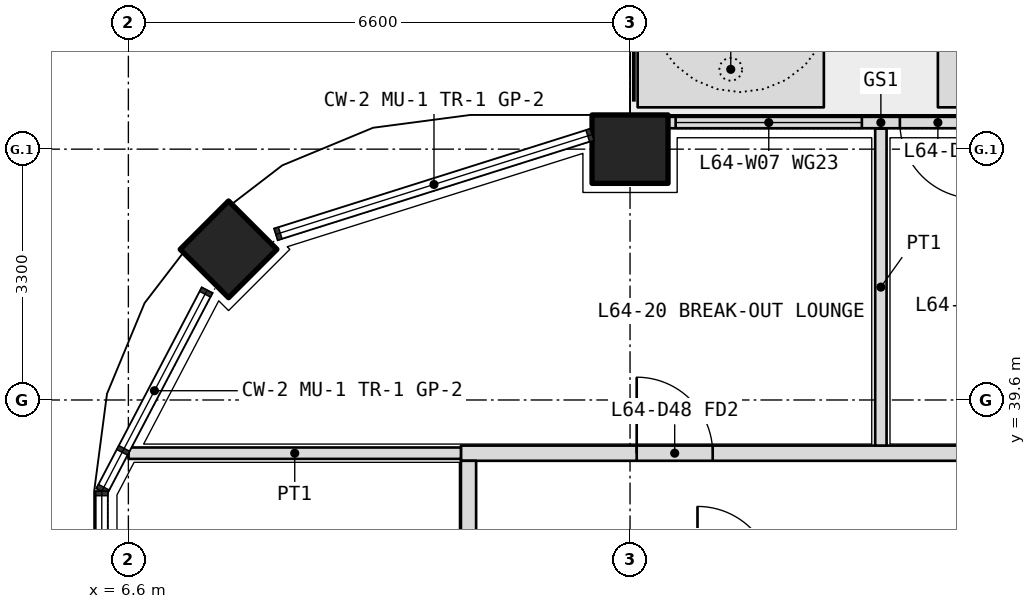
"""IFC4 building model, lengths in metres.
Left out: names, types, materials, properties, quantities, classifications, styles, units other than length and angle.
Written with IfcOpenShell. Run it as: python <this file> out.ifc"""

import sys

from ifc_helpers import new_model, si_unit, direction, frame, frame_2d, origin, origin_2d, place, context, subcontext, project, spatial, polyline, rectangle, outline, extrude, element, fill, save


model = new_model("IFC4")
c1 = context("Model", 3, precision=1e-05, world=origin(), true_north=direction((0.0, 1.0)))
c2 = subcontext(c1, "Body", "Model", "MODEL_VIEW")
j1 = project(units=[si_unit("LENGTHUNIT", "METRE"), si_unit("PLANEANGLEUNIT", "RADIAN")], contexts=[c1])
p1 = place(None, origin())
s1 = spatial("IfcSite", under=j1, at=p1, CompositionType="ELEMENT")
p2 = place(p1, origin())
s2 = spatial("IfcBuilding", under=s1, at=p2, CompositionType="ELEMENT")
p3 = place(p2, frame((0.0, 0.0, 279.6)))
s3 = spatial("IfcBuildingStorey", under=s2, at=p3, CompositionType="ELEMENT", Elevation=279.6)
p4 = place(p3, frame((7.918, 41.582, 0.0), z_axis=(0.0, 0.0, 1.0), x_axis=(0.707106781187, 0.707106781187, 0.0)))
e1 = element("IfcColumn", 1, at=p4, inside=s3, PredefinedType="COLUMN", context=c2, shape_type="SweptSolid", body=[
    extrude(rectangle(XDim=0.9, YDim=0.9, at=origin_2d()), origin(), (0.0, 0.0, 1.0), 4.2),
])
p5 = place(p3, frame((13.2, 42.9, 0.0), z_axis=(0.0, 0.0, 1.0), x_axis=(1.0, 0.0, 0.0)))
e2 = element("IfcColumn", 2, at=p5, inside=s3, PredefinedType="COLUMN", context=c2, shape_type="SweptSolid", body=[
    extrude(rectangle(XDim=1.0, YDim=0.9, at=origin_2d()), origin(), (0.0, 0.0, 1.0), 4.2),
])
p6 = place(p3, origin())
e3 = element("IfcWall", 3, at=p6, inside=s3, PredefinedType="USERDEFINED", context=c2, shape_type="SweptSolid", body=[
    extrude(outline(polyline([(13.3, 43.45), (15.75, 43.45), (15.75, 44.45), (13.3, 44.45), (13.3, 43.45)]), holes=[polyline([(13.45, 43.6), (15.6, 43.6), (15.6, 44.3), (13.45, 44.3), (13.45, 43.6)])]), origin(), (0.0, 0.0, 1.0), 1.05),
])
p7 = place(p3, origin())
e4 = element("IfcWall", 4, at=p7, inside=s3, PredefinedType="USERDEFINED", context=c2, shape_type="SweptSolid", body=[
    extrude(outline(polyline([(17.25, 43.45), (26.3, 43.45), (26.3, 44.45), (17.25, 44.45), (17.25, 43.45)]), holes=[polyline([(17.4, 43.6), (26.15, 43.6), (26.15, 44.3), (17.4, 44.3), (17.4, 43.6)])]), origin(), (0.0, 0.0, 1.0), 1.05),
])
p8 = place(p3, frame((19.3, 43.25, 0.0), z_axis=(0.0, 0.0, 1.0), x_axis=(-1.0, 0.0, 0.0)))
e5 = element("IfcWall", 5, at=p8, inside=s3, PredefinedType="SOLIDWALL", context=c2, shape_type="SweptSolid", body=[
    extrude(rectangle(XDim=5.6, YDim=0.15, at=frame_2d((2.8, 0.0))), origin(), (0.0, 0.0, 1.0), 2.7),
])
p9 = place(p8, frame((1.55, 0.0, 0.0)))
e6 = element("IfcOpeningElement", 6, at=p9, cuts=e5, PredefinedType="OPENING", context=c2, shape_type="SweptSolid", body=[
    extrude(rectangle(XDim=1.0, YDim=2.4, at=frame_2d((0.5, 1.2))), frame((0.0, 0.085, 0.0), z_axis=(0.0, -1.0, 0.0), x_axis=(1.0, 0.0, 0.0)), (0.0, 0.0, 1.0), 0.17),
])
p10 = place(p8, frame((0.1, 0.0, 0.1)))
e7 = element("IfcOpeningElement", 7, at=p10, cuts=e5, PredefinedType="OPENING", context=c2, shape_type="SweptSolid", body=[
    extrude(rectangle(XDim=1.35, YDim=2.3, at=frame_2d((0.675, 1.15))), frame((0.0, 0.085, 0.0), z_axis=(0.0, -1.0, 0.0), x_axis=(1.0, 0.0, 0.0)), (0.0, 0.0, 1.0), 0.17),
])
p11 = place(p8, frame((3.05, 0.0, 0.1)))
e8 = element("IfcOpeningElement", 8, at=p11, cuts=e5, PredefinedType="OPENING", context=c2, shape_type="SweptSolid", body=[
    extrude(rectangle(XDim=2.45, YDim=2.3, at=frame_2d((1.225, 1.15))), frame((0.0, 0.085, 0.0), z_axis=(0.0, -1.0, 0.0), x_axis=(1.0, 0.0, 0.0)), (0.0, 0.0, 1.0), 0.17),
])
p12 = place(p3, frame((10.975, 38.9, 0.0), z_axis=(0.0, 0.0, 1.0), x_axis=(1.0, 0.0, 0.0)))
e9 = element("IfcWall", 9, at=p12, inside=s3, PredefinedType="PARTITIONING", context=c2, shape_type="SweptSolid", body=[
    extrude(rectangle(XDim=30.85, YDim=0.2, at=frame_2d((15.425, 0.0))), origin(), (0.0, 0.0, 1.0), 3.0),
])
p13 = place(p12, frame((2.312, 0.0, 0.0)))
e10 = element("IfcOpeningElement", 10, at=p13, cuts=e9, PredefinedType="OPENING", context=c2, shape_type="SweptSolid", body=[
    extrude(rectangle(XDim=1.0, YDim=2.1, at=frame_2d((0.5, 1.05))), frame((0.0, 0.11, 0.0), z_axis=(0.0, -1.0, 0.0), x_axis=(1.0, 0.0, 0.0)), (0.0, 0.0, 1.0), 0.22),
])
p14 = place(p12, frame((7.125, 0.0, 0.0)))
e11 = element("IfcOpeningElement", 11, at=p14, cuts=e9, PredefinedType="OPENING", context=c2, shape_type="SweptSolid", body=[
    extrude(rectangle(XDim=1.0, YDim=2.1, at=frame_2d((0.5, 1.05))), frame((0.0, 0.11, 0.0), z_axis=(0.0, -1.0, 0.0), x_axis=(1.0, 0.0, 0.0)), (0.0, 0.0, 1.0), 0.22),
])
p15 = place(p12, frame((10.425, 0.0, 0.0)))
e12 = element("IfcOpeningElement", 12, at=p15, cuts=e9, PredefinedType="OPENING", context=c2, shape_type="SweptSolid", body=[
    extrude(rectangle(XDim=1.0, YDim=2.1, at=frame_2d((0.5, 1.05))), frame((0.0, 0.11, 0.0), z_axis=(0.0, -1.0, 0.0), x_axis=(1.0, 0.0, 0.0)), (0.0, 0.0, 1.0), 0.22),
])
p16 = place(p12, frame((13.275, 0.0, 0.0)))
e13 = element("IfcOpeningElement", 13, at=p16, cuts=e9, PredefinedType="OPENING", context=c2, shape_type="SweptSolid", body=[
    extrude(rectangle(XDim=1.0, YDim=2.1, at=frame_2d((0.5, 1.05))), frame((0.0, 0.11, 0.0), z_axis=(0.0, -1.0, 0.0), x_axis=(1.0, 0.0, 0.0)), (0.0, 0.0, 1.0), 0.22),
])
p17 = place(p12, frame((22.587, 0.0, 0.0)))
e14 = element("IfcOpeningElement", 14, at=p17, cuts=e9, PredefinedType="OPENING", context=c2, shape_type="SweptSolid", body=[
    extrude(rectangle(XDim=1.0, YDim=2.1, at=frame_2d((0.5, 1.05))), frame((0.0, 0.11, 0.0), z_axis=(0.0, -1.0, 0.0), x_axis=(1.0, 0.0, 0.0)), (0.0, 0.0, 1.0), 0.22),
])
p18 = place(p3, frame((11.075, 7.4, 0.0), z_axis=(0.0, 0.0, 1.0), x_axis=(0.0, 1.0, 0.0)))
e15 = element("IfcWall", 15, at=p18, inside=s3, PredefinedType="PARTITIONING", context=c2, shape_type="SweptSolid", body=[
    extrude(rectangle(XDim=31.4, YDim=0.2, at=frame_2d((15.7, 0.0))), origin(), (0.0, 0.0, 1.0), 3.0),
])
p19 = place(p18, frame((2.35, 0.0, 0.0)))
e16 = element("IfcOpeningElement", 16, at=p19, cuts=e15, PredefinedType="OPENING", context=c2, shape_type="SweptSolid", body=[
    extrude(rectangle(XDim=1.0, YDim=2.1, at=frame_2d((0.5, 1.05))), frame((0.0, 0.11, 0.0), z_axis=(0.0, -1.0, 0.0), x_axis=(1.0, 0.0, 0.0)), (0.0, 0.0, 1.0), 0.22),
])
p20 = place(p18, frame((6.9, 0.0, 0.0)))
e17 = element("IfcOpeningElement", 17, at=p20, cuts=e15, PredefinedType="OPENING", context=c2, shape_type="SweptSolid", body=[
    extrude(rectangle(XDim=1.0, YDim=2.1, at=frame_2d((0.5, 1.05))), frame((0.0, 0.11, 0.0), z_axis=(0.0, -1.0, 0.0), x_axis=(1.0, 0.0, 0.0)), (0.0, 0.0, 1.0), 0.22),
])
p21 = place(p18, frame((10.35, 0.0, 0.0)))
e18 = element("IfcOpeningElement", 18, at=p21, cuts=e15, PredefinedType="OPENING", context=c2, shape_type="SweptSolid", body=[
    extrude(rectangle(XDim=0.9, YDim=2.1, at=frame_2d((0.45, 1.05))), frame((0.0, 0.11, 0.0), z_axis=(0.0, -1.0, 0.0), x_axis=(1.0, 0.0, 0.0)), (0.0, 0.0, 1.0), 0.22),
])
p22 = place(p18, frame((13.7, 0.0, 0.0)))
e19 = element("IfcOpeningElement", 19, at=p22, cuts=e15, PredefinedType="OPENING", context=c2, shape_type="SweptSolid", body=[
    extrude(rectangle(XDim=0.9, YDim=2.1, at=frame_2d((0.45, 1.05))), frame((0.0, 0.11, 0.0), z_axis=(0.0, -1.0, 0.0), x_axis=(1.0, 0.0, 0.0)), (0.0, 0.0, 1.0), 0.22),
])
p23 = place(p18, frame((23.1, 0.0, 0.0)))
e20 = element("IfcOpeningElement", 20, at=p23, cuts=e15, PredefinedType="OPENING", context=c2, shape_type="SweptSolid", body=[
    extrude(rectangle(XDim=1.0, YDim=2.1, at=frame_2d((0.5, 1.05))), frame((0.0, 0.11, 0.0), z_axis=(0.0, -1.0, 0.0), x_axis=(1.0, 0.0, 0.0)), (0.0, 0.0, 1.0), 0.22),
])
p24 = place(p3, frame((6.603, 38.9, 0.0), z_axis=(0.0, 0.0, 1.0), x_axis=(1.0, 0.0, 0.0)))
e21 = element("IfcWall", 21, at=p24, inside=s3, PredefinedType="PARTITIONING", context=c2, shape_type="SweptSolid", body=[
    extrude(rectangle(XDim=4.373, YDim=0.15, at=frame_2d((2.186, 0.0))), origin(), (0.0, 0.0, 1.0), 2.7),
])
p25 = place(p3, frame((16.5, 43.17, 0.0), z_axis=(0.0, 0.0, 1.0), x_axis=(0.0, -1.0, 0.0)))
e22 = element("IfcWall", 22, at=p25, inside=s3, PredefinedType="PARTITIONING", context=c2, shape_type="SweptSolid", body=[
    extrude(rectangle(XDim=4.17, YDim=0.15, at=frame_2d((2.085, 0.0))), origin(), (0.0, 0.0, 1.0), 2.7),
])
p26 = place(p9, origin())
e23 = element("IfcDoor", 23, at=p26, inside=s3, OperationType="SINGLE_SWING_LEFT", PredefinedType="DOOR", context=c2, shape_type="SweptSolid", body=[
    extrude(rectangle(XDim=1.0, YDim=2.4, at=frame_2d((0.5, 1.2))), frame((0.0, 0.025, 0.0), z_axis=(0.0, -1.0, 0.0), x_axis=(1.0, 0.0, 0.0)), (0.0, 0.0, 1.0), 0.05),
])
fill(e6, e23)
p27 = place(p11, origin())
e24 = element("IfcWindow", 24, at=p27, inside=s3, PartitioningType="SINGLE_PANEL", PredefinedType="WINDOW", context=c2, shape_type="SweptSolid", body=[
    extrude(rectangle(XDim=2.45, YDim=2.3, at=frame_2d((1.225, 1.15))), frame((0.0, 0.03, 0.0), z_axis=(0.0, -1.0, 0.0), x_axis=(1.0, 0.0, 0.0)), (0.0, 0.0, 1.0), 0.06),
])
fill(e8, e24)
p28 = place(p13, origin())
e25 = element("IfcDoor", 25, at=p28, inside=s3, OperationType="SINGLE_SWING_LEFT", PredefinedType="DOOR", context=c2, shape_type="SweptSolid", body=[
    extrude(rectangle(XDim=1.0, YDim=2.1, at=frame_2d((0.5, 1.05))), frame((0.0, 0.025, 0.0), z_axis=(0.0, -1.0, 0.0), x_axis=(1.0, 0.0, 0.0)), (0.0, 0.0, 1.0), 0.05),
])
fill(e10, e25)
save(model, sys.argv[1])
